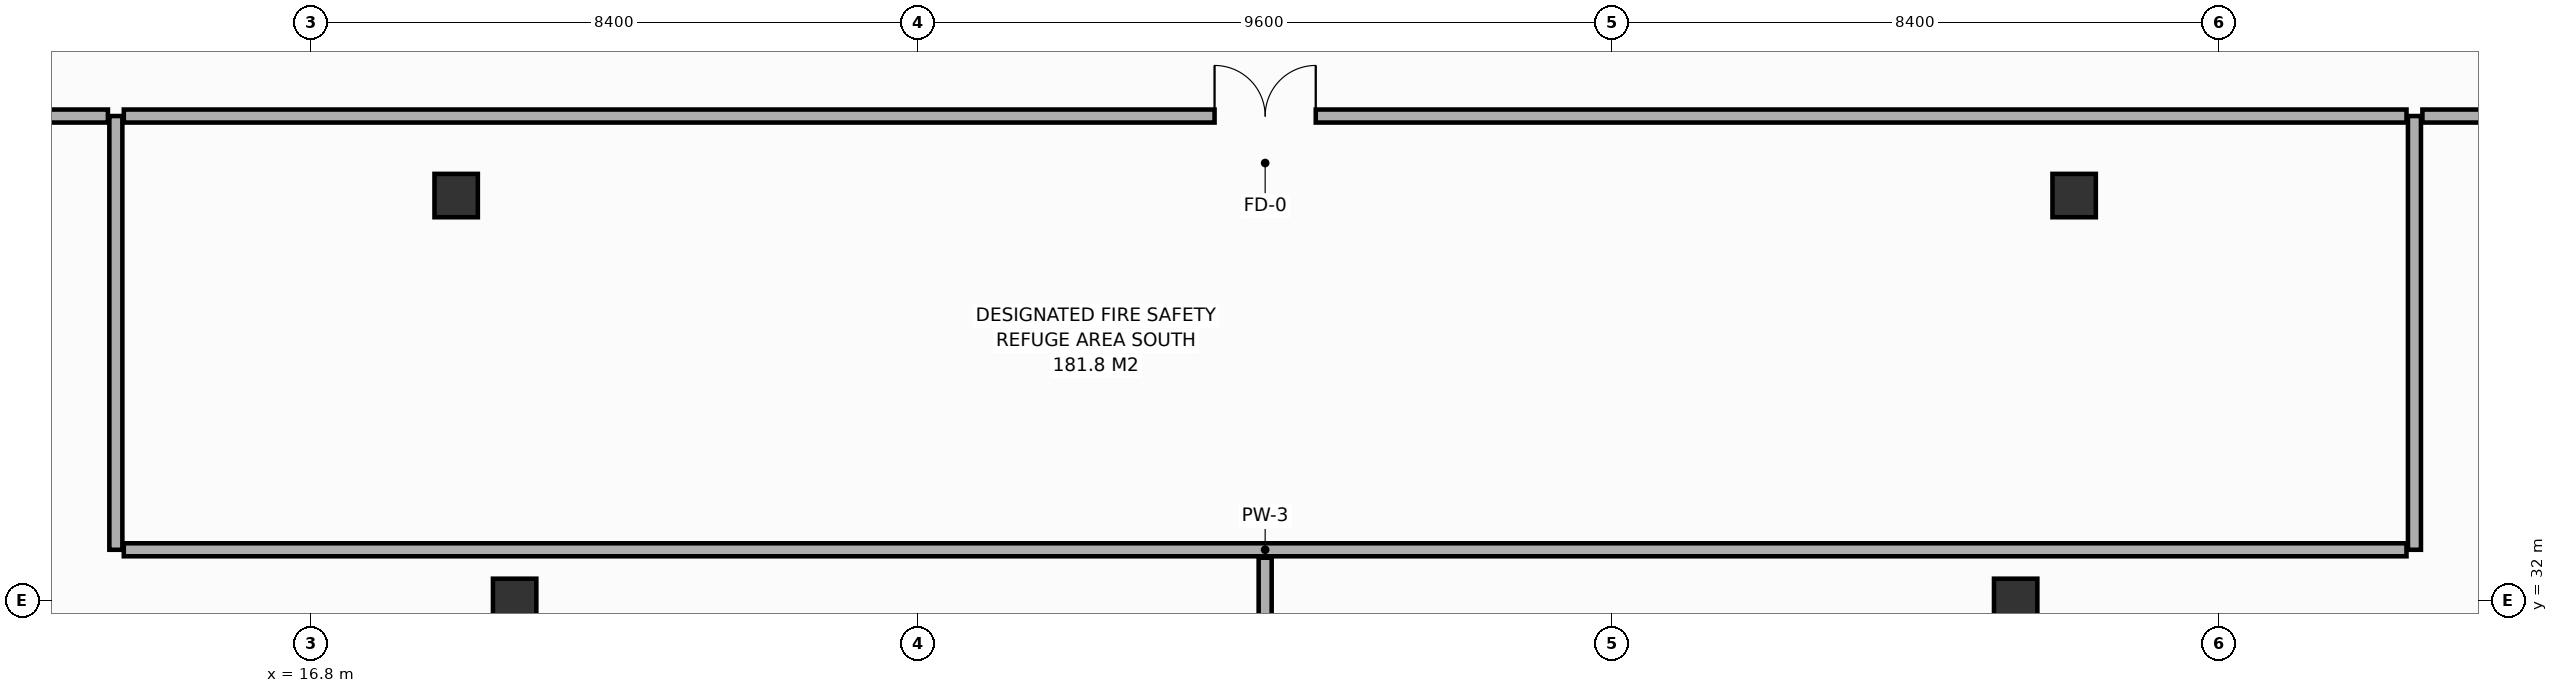
"""IFC4 building model, lengths in metres.
Left out: names, types, materials, properties, quantities, classifications, styles, units other than length and angle.
Written with IfcOpenShell. Run it as: python <this file> out.ifc"""

import sys

from ifc_helpers import new_model, si_unit, direction, frame, frame_2d, origin, origin_2d, place, context, subcontext, project, spatial, rectangle, hollow_rectangle, extrude, element, fill, save


model = new_model("IFC4")
c1 = context("Model", 3, precision=1e-05, world=origin(), true_north=direction((0.0, 1.0)))
c2 = subcontext(c1, "Body", "Model", "MODEL_VIEW")
j1 = project(units=[si_unit("LENGTHUNIT", "METRE"), si_unit("PLANEANGLEUNIT", "RADIAN")], contexts=[c1])
p1 = place(None, origin())
s1 = spatial("IfcSite", under=j1, at=p1, CompositionType="ELEMENT")
p2 = place(p1, origin())
s2 = spatial("IfcBuilding", under=s1, at=p2, CompositionType="ELEMENT")
p3 = place(p2, frame((0.0, 0.0, 123.6)))
s3 = spatial("IfcBuildingStorey", under=s2, at=p3, CompositionType="ELEMENT", Elevation=123.6)
for number, where, z_axis, x_axis in (
    (1, (19.617, 32.0, 0.0), (0.0, 0.0, 1.0), (1.0, 0.0, 0.0)),
    (2, (40.383, 32.0, 0.0), (0.0, 0.0, 1.0), (1.0, 0.0, 0.0)),
    (3, (18.808, 37.6, 0.0), (0.0, 0.0, 1.0), (1.0, 0.0, 0.0)),
    (4, (41.192, 37.6, 0.0), (0.0, 0.0, 1.0), (1.0, 0.0, 0.0)),
):
    element("IfcColumn", number, at=place(p3, frame(where, z_axis=z_axis, x_axis=x_axis)), inside=s3, PredefinedType="COLUMN", context=c2, shape_type="SweptSolid", body=[
        extrude(hollow_rectangle(XDim=0.6, YDim=0.6, WallThickness=0.028, at=origin_2d()), origin(), (0.0, 0.0, 1.0), 6.0),
    ])
for number, where, z_axis, x_axis in (
    (5, (14.1, 32.7, 0.0), (0.0, 0.0, 1.0), (0.0, 1.0, 0.0)),
    (6, (45.9, 32.7, 0.0), (0.0, 0.0, 1.0), (0.0, 1.0, 0.0)),
):
    element("IfcWall", number, at=place(p3, frame(where, z_axis=z_axis, x_axis=x_axis)), inside=s3, PredefinedType="PARTITIONING", context=c2, shape_type="SweptSolid", body=[
        extrude(rectangle(XDim=6.0, YDim=0.18, at=frame_2d((3.0, 0.0))), origin(), (0.0, 0.0, 1.0), 5.035),
    ])
p4 = place(p3, frame((14.21, 32.7, 0.0), z_axis=(0.0, 0.0, 1.0), x_axis=(1.0, 0.0, 0.0)))
e7 = element("IfcWall", 7, at=p4, inside=s3, PredefinedType="PARTITIONING", context=c2, shape_type="SweptSolid", body=[
    extrude(rectangle(XDim=31.58, YDim=0.18, at=frame_2d((15.79, 0.0))), origin(), (0.0, 0.0, 1.0), 5.035),
])
p5 = place(p3, frame((14.21, 38.7, 0.0), z_axis=(0.0, 0.0, 1.0), x_axis=(1.0, 0.0, 0.0)))
e8 = element("IfcWall", 8, at=p5, inside=s3, PredefinedType="PARTITIONING", context=c2, shape_type="SweptSolid", body=[
    extrude(rectangle(XDim=31.58, YDim=0.18, at=frame_2d((15.79, 0.0))), origin(), (0.0, 0.0, 1.0), 5.035),
])
p6 = place(p5, frame((15.09, 0.0, 0.0)))
e9 = element("IfcOpeningElement", 9, at=p6, cuts=e8, PredefinedType="OPENING", context=c2, shape_type="SweptSolid", body=[
    extrude(rectangle(XDim=1.4, YDim=2.2, at=frame_2d((0.7, 1.1))), frame((0.0, 0.1, 0.0), z_axis=(0.0, -1.0, 0.0), x_axis=(1.0, 0.0, 0.0)), (0.0, 0.0, 1.0), 0.2),
])
p7 = place(p3, frame((30.0, 20.805, 0.0), z_axis=(0.0, 0.0, 1.0), x_axis=(0.0, 1.0, 0.0)))
e10 = element("IfcWall", 10, at=p7, inside=s3, PredefinedType="PARTITIONING", context=c2, shape_type="SweptSolid", body=[
    extrude(rectangle(XDim=11.785, YDim=0.18, at=frame_2d((5.893, 0.0))), origin(), (0.0, 0.0, 1.0), 5.75),
])
p8 = place(p3, frame((6.499, 38.7, 0.0), z_axis=(0.0, 0.0, 1.0), x_axis=(1.0, 0.0, 0.0)))
e11 = element("IfcWall", 11, at=p8, inside=s3, PredefinedType="PARTITIONING", context=c2, shape_type="SweptSolid", body=[
    extrude(rectangle(XDim=7.491, YDim=0.18, at=frame_2d((3.746, 0.0))), origin(), (0.0, 0.0, 1.0), 5.235),
])
p9 = place(p8, frame((3.196, 0.0, 0.0)))
e12 = element("IfcOpeningElement", 12, at=p9, cuts=e11, PredefinedType="OPENING", context=c2, shape_type="SweptSolid", body=[
    extrude(rectangle(XDim=1.1, YDim=2.15, at=frame_2d((0.55, 1.075))), frame((0.0, 0.1, 0.0), z_axis=(0.0, -1.0, 0.0), x_axis=(1.0, 0.0, 0.0)), (0.0, 0.0, 1.0), 0.2),
])
p10 = place(p3, frame((46.01, 38.7, 0.0), z_axis=(0.0, 0.0, 1.0), x_axis=(1.0, 0.0, 0.0)))
e13 = element("IfcWall", 13, at=p10, inside=s3, PredefinedType="PARTITIONING", context=c2, shape_type="SweptSolid", body=[
    extrude(rectangle(XDim=7.491, YDim=0.18, at=frame_2d((3.746, 0.0))), origin(), (0.0, 0.0, 1.0), 5.235),
])
p11 = place(p10, frame((3.196, 0.0, 0.0)))
e14 = element("IfcOpeningElement", 14, at=p11, cuts=e13, PredefinedType="OPENING", context=c2, shape_type="SweptSolid", body=[
    extrude(rectangle(XDim=1.1, YDim=2.15, at=frame_2d((0.55, 1.075))), frame((0.0, 0.1, 0.0), z_axis=(0.0, -1.0, 0.0), x_axis=(1.0, 0.0, 0.0)), (0.0, 0.0, 1.0), 0.2),
])
p12 = place(p6, origin())
e15 = element("IfcDoor", 15, at=p12, inside=s3, OperationType="DOUBLE_DOOR_SINGLE_SWING", PredefinedType="DOOR", context=c2, shape_type="SweptSolid", body=[
    extrude(rectangle(XDim=1.4, YDim=2.2, at=frame_2d((0.7, 1.1))), frame((0.0, 0.025, 0.0), z_axis=(0.0, -1.0, 0.0), x_axis=(1.0, 0.0, 0.0)), (0.0, 0.0, 1.0), 0.05),
])
fill(e9, e15)
save(model, sys.argv[1])
